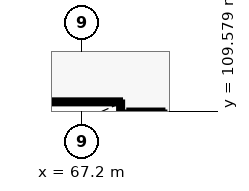
"""IFC4 building model, lengths in metres.
Left out: names, types, materials, properties, quantities, classifications, styles, units other than length and angle.
Written with IfcOpenShell. Run it as: python <this file> out.ifc"""

import sys

from ifc_helpers import new_model, si_unit, direction, frame, frame_2d, origin, place, context, subcontext, project, spatial, rectangle, extrude, element, fill, save


model = new_model("IFC4")
c1 = context("Model", 3, precision=1e-05, world=origin(), true_north=direction((0.0, 1.0)))
c2 = subcontext(c1, "Body", "Model", "MODEL_VIEW")
j1 = project(units=[si_unit("LENGTHUNIT", "METRE"), si_unit("PLANEANGLEUNIT", "RADIAN")], contexts=[c1])
p1 = place(None, origin())
s1 = spatial("IfcSite", under=j1, at=p1, CompositionType="ELEMENT")
p2 = place(p1, origin())
s2 = spatial("IfcBuilding", under=s1, at=p2, CompositionType="ELEMENT")
p3 = place(p2, frame((0.0, 0.0, 5.44)))
s3 = spatial("IfcBuildingStorey", under=s2, at=p3, CompositionType="ELEMENT", Elevation=5.44)
p4 = place(p3, frame((60.86, 110.19, 0.0), z_axis=(0.0, 0.0, 1.0), x_axis=(1.0, 0.0, 0.0)))
e1 = element("IfcWall", 1, at=p4, inside=s3, PredefinedType="SHEAR", context=c2, shape_type="SweptSolid", body=[
    extrude(rectangle(XDim=8.88, YDim=0.28, at=frame_2d((4.44, 0.0))), origin(), (0.0, 0.0, 1.0), 3.98),
])
p5 = place(p3, frame((69.74, 106.76, 0.0), z_axis=(0.0, 0.0, 1.0), x_axis=(0.0, 1.0, 0.0)))
e2 = element("IfcWall", 2, at=p5, inside=s3, PredefinedType="SHEAR", context=c2, shape_type="SweptSolid", body=[
    extrude(rectangle(XDim=3.43, YDim=0.28, at=frame_2d((1.715, 0.0))), origin(), (0.0, 0.0, 1.0), 3.98),
])
p6 = place(p3, frame((70.27, 109.53, 0.0), z_axis=(0.0, 0.0, 1.0), x_axis=(1.0, 0.0, 0.0)))
e3 = element("IfcWall", 3, at=p6, inside=s3, PredefinedType="SHEAR", context=c2, shape_type="SweptSolid", body=[
    extrude(rectangle(XDim=2.26, YDim=0.26, at=frame_2d((1.13, 0.0))), origin(), (0.0, 0.0, 1.0), 3.98),
])
p7 = place(p6, frame((0.51, 0.0, 0.0)))
e4 = element("IfcOpeningElement", 4, at=p7, cuts=e3, PredefinedType="OPENING", context=c2, shape_type="SweptSolid", body=[
    extrude(rectangle(XDim=1.24, YDim=2.14, at=frame_2d((0.62, 1.07))), frame((0.0, 0.14, 0.0), z_axis=(0.0, -1.0, 0.0), x_axis=(1.0, 0.0, 0.0)), (0.0, 0.0, 1.0), 0.28),
])
p8 = place(p7, origin())
e5 = element("IfcDoor", 5, at=p8, inside=s3, OperationType="DOUBLE_DOOR_SLIDING", PredefinedType="DOOR", context=c2, shape_type="SweptSolid", body=[
    extrude(rectangle(XDim=1.24, YDim=2.14, at=frame_2d((0.62, 1.07))), frame((0.0, 0.025, 0.0), z_axis=(0.0, -1.0, 0.0), x_axis=(1.0, 0.0, 0.0)), (0.0, 0.0, 1.0), 0.05),
])
fill(e4, e5)
save(model, sys.argv[1])
